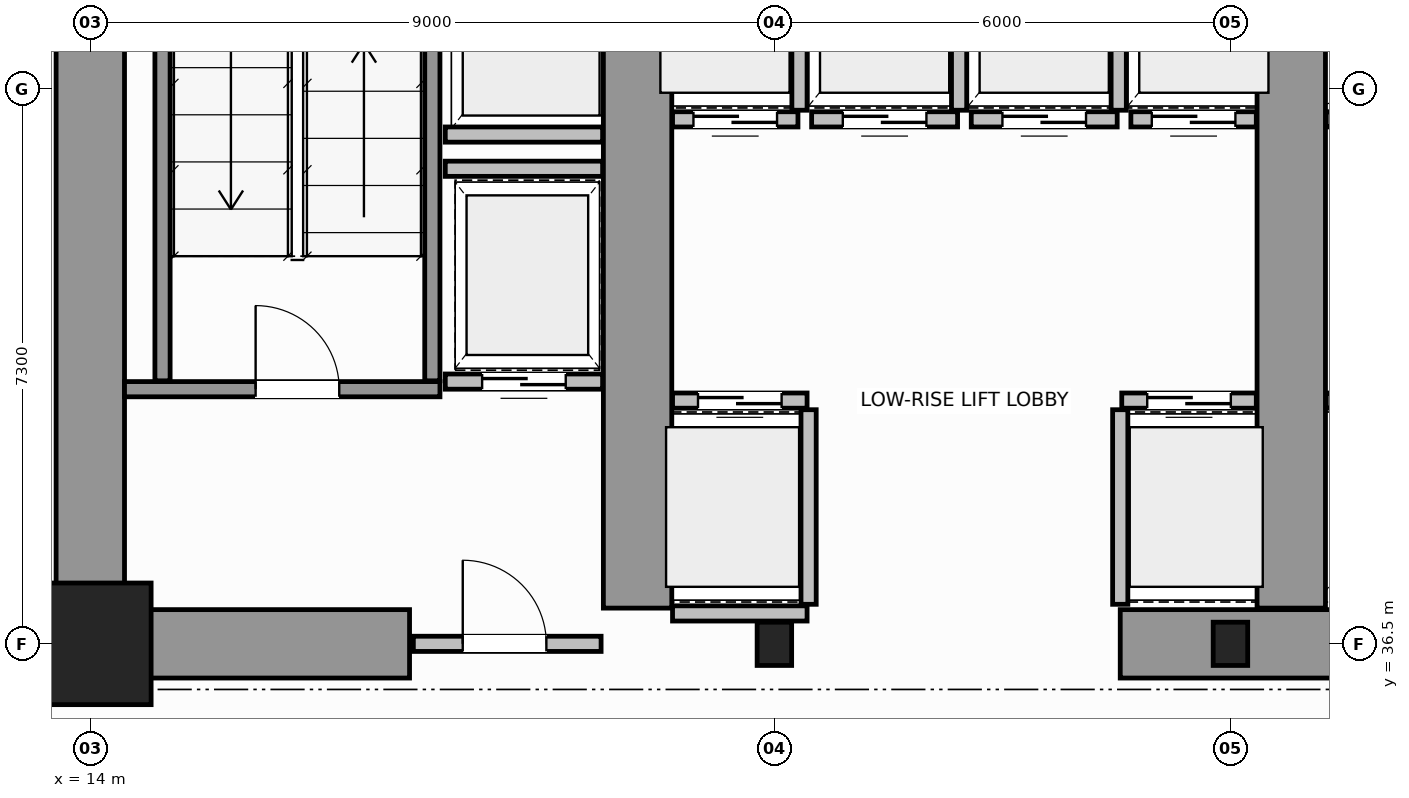
"""IFC4 building model, lengths in metres.
Left out: names, types, materials, properties, quantities, classifications, styles, units other than length and angle.
Written with IfcOpenShell. Run it as: python <this file> out.ifc"""

import sys

from ifc_helpers import new_model, si_unit, direction, frame, frame_2d, origin, origin_2d, place, context, subcontext, project, spatial, rectangle, i_section, extrude, source, transform, mapped, element, fill, save


model = new_model("IFC4")
c1 = context("Model", 3, precision=1e-05, world=origin(), true_north=direction((0.0, 1.0)))
c2 = subcontext(c1, "Body", "Model", "MODEL_VIEW")
j1 = project(units=[si_unit("LENGTHUNIT", "METRE"), si_unit("PLANEANGLEUNIT", "RADIAN")], contexts=[c1])
p1 = place(None, origin())
s1 = spatial("IfcSite", under=j1, at=p1, CompositionType="ELEMENT")
p2 = place(p1, origin())
s2 = spatial("IfcBuilding", under=s1, at=p2, CompositionType="ELEMENT")
p3 = place(p2, frame((0.0, 0.0, 30.2)))
s3 = spatial("IfcBuildingStorey", under=s2, at=p3, CompositionType="ELEMENT", Elevation=30.2)
m1 = source(origin(), c2, "Body", "SweptSolid", [
    extrude(rectangle(XDim=1.6, YDim=1.6, at=origin_2d()), origin(), (0.0, 0.0, 1.0), 3.8),
])
p4 = place(p3, frame((14.0, 36.5, 0.0), z_axis=(0.0, 0.0, 1.0), x_axis=(1.0, 0.0, 0.0)))
e1 = element("IfcColumn", 1, at=p4, inside=s3, PredefinedType="COLUMN", context=c2, shape_type="MappedRepresentation", body=[
    mapped(m1, transform((0.0, 0.0, 0.0), scale=1.0)),
])
m2 = source(origin(), c2, "Body", "SweptSolid", [
    extrude(i_section(OverallWidth=0.454, OverallDepth=0.569, WebThickness=0.078, FlangeThickness=0.08, FilletRadius=0.015, at=origin_2d()), origin(), (0.0, 0.0, 1.0), 3.8),
])
for number, where, z_axis, x_axis in (
    (2, (23.0, 36.5, 0.0), (0.0, 0.0, 1.0), (1.0, 0.0, 0.0)),
    (3, (29.0, 36.5, 0.0), (0.0, 0.0, 1.0), (1.0, 0.0, 0.0)),
):
    element("IfcColumn", number, at=place(p3, frame(where, z_axis=z_axis, x_axis=x_axis)), inside=s3, PredefinedType="COLUMN", context=c2, shape_type="MappedRepresentation", body=[
        mapped(m2, transform((0.0, 0.0, 0.0), scale=1.0)),
    ])
p5 = place(p3, frame((14.0, 36.5, 0.0), z_axis=(0.0, 0.0, 1.0), x_axis=(0.0, 1.0, 0.0)))
e4 = element("IfcWall", 4, at=p5, inside=s3, PredefinedType="SHEAR", context=c2, shape_type="SweptSolid", body=[
    extrude(rectangle(XDim=14.5, YDim=0.9, at=frame_2d((7.25, 0.0))), origin(), (0.0, 0.0, 1.0), 3.8),
])
p6 = place(p3, frame((14.47, 36.5, 0.0), z_axis=(0.0, 0.0, 1.0), x_axis=(1.0, 0.0, 0.0)))
e5 = element("IfcWall", 5, at=p6, inside=s3, PredefinedType="SHEAR", context=c2, shape_type="SweptSolid", body=[
    extrude(rectangle(XDim=3.73, YDim=0.9, at=frame_2d((1.865, 0.0))), origin(), (0.0, 0.0, 1.0), 2.38),
])
p7 = place(p3, frame((27.55, 36.5, 0.0), z_axis=(0.0, 0.0, 1.0), x_axis=(1.0, 0.0, 0.0)))
e6 = element("IfcWall", 6, at=p7, inside=s3, PredefinedType="SHEAR", context=c2, shape_type="SweptSolid", body=[
    extrude(rectangle(XDim=4.5, YDim=0.9, at=frame_2d((2.25, 0.0))), origin(), (0.0, 0.0, 1.0), 3.8),
])
for number, where, z_axis, x_axis in (
    (7, (21.2, 36.97, 0.0), (0.0, 0.0, 1.0), (0.0, 1.0, 0.0)),
    (8, (29.8, 36.97, 0.0), (0.0, 0.0, 1.0), (0.0, 1.0, 0.0)),
):
    element("IfcWall", number, at=place(p3, frame(where, z_axis=z_axis, x_axis=x_axis)), inside=s3, PredefinedType="SHEAR", context=c2, shape_type="SweptSolid", body=[
        extrude(rectangle(XDim=9.23, YDim=0.9, at=frame_2d((4.615, 0.0))), origin(), (0.0, 0.0, 1.0), 3.8),
    ])
p8 = place(p3, frame((14.45, 39.85, 0.0), z_axis=(0.0, 0.0, 1.0), x_axis=(1.0, 0.0, 0.0)))
e9 = element("IfcWall", 9, at=p8, inside=s3, PredefinedType="SOLIDWALL", context=c2, shape_type="SweptSolid", body=[
    extrude(rectangle(XDim=4.15, YDim=0.2, at=frame_2d((2.075, 0.0))), origin(), (0.0, 0.0, 1.0), 3.8),
])
p9 = place(p8, frame((1.725, 0.0, 0.0)))
e10 = element("IfcOpeningElement", 10, at=p9, cuts=e9, PredefinedType="OPENING", context=c2, shape_type="SweptSolid", body=[
    extrude(rectangle(XDim=1.1, YDim=2.15, at=frame_2d((0.55, 1.075))), frame((0.0, 0.11, 0.0), z_axis=(0.0, -1.0, 0.0), x_axis=(1.0, 0.0, 0.0)), (0.0, 0.0, 1.0), 0.22),
])
for number, where, z_axis, x_axis in (
    (11, (14.95, 39.96, 0.0), (0.0, 0.0, 1.0), (0.0, 1.0, 0.0)),
    (12, (18.5, 39.96, 0.0), (0.0, 0.0, 1.0), (0.0, 1.0, 0.0)),
):
    element("IfcWall", number, at=place(p3, frame(where, z_axis=z_axis, x_axis=x_axis)), inside=s3, PredefinedType="SOLIDWALL", context=c2, shape_type="SweptSolid", body=[
        extrude(rectangle(XDim=9.93, YDim=0.2, at=frame_2d((4.965, 0.0))), origin(), (0.0, 0.0, 1.0), 3.8),
    ])
p10 = place(p3, frame((18.25, 36.5, 0.0), z_axis=(0.0, 0.0, 1.0), x_axis=(1.0, 0.0, 0.0)))
e13 = element("IfcWall", 13, at=p10, inside=s3, PredefinedType="SOLIDWALL", context=c2, shape_type="SweptSolid", body=[
    extrude(rectangle(XDim=2.47, YDim=0.2, at=frame_2d((1.235, 0.0))), origin(), (0.0, 0.0, 1.0), 2.37),
])
p11 = place(p10, frame((0.65, 0.0, 0.0)))
e14 = element("IfcOpeningElement", 14, at=p11, cuts=e13, PredefinedType="OPENING", context=c2, shape_type="SweptSolid", body=[
    extrude(rectangle(XDim=1.1, YDim=2.15, at=frame_2d((0.55, 1.075))), frame((0.0, 0.11, 0.0), z_axis=(0.0, -1.0, 0.0), x_axis=(1.0, 0.0, 0.0)), (0.0, 0.0, 1.0), 0.22),
])
p12 = place(p3, frame((21.66, 39.7, 0.0), z_axis=(0.0, 0.0, 1.0), x_axis=(1.0, 0.0, 0.0)))
e15 = element("IfcWall", 15, at=p12, inside=s3, PredefinedType="SOLIDWALL", context=c2, shape_type="SweptSolid", body=[
    extrude(rectangle(XDim=1.77, YDim=0.2, at=frame_2d((0.885, 0.0))), origin(), (0.0, 0.0, 1.0), 3.58),
])
p13 = place(p12, frame((0.335, 0.0, 0.0)))
e16 = element("IfcOpeningElement", 16, at=p13, cuts=e15, PredefinedType="OPENING", context=c2, shape_type="SweptSolid", body=[
    extrude(rectangle(XDim=1.1, YDim=2.15, at=frame_2d((0.55, 1.075))), frame((0.0, 0.11, 0.0), z_axis=(0.0, -1.0, 0.0), x_axis=(1.0, 0.0, 0.0)), (0.0, 0.0, 1.0), 0.22),
])
p14 = place(p3, frame((21.66, 36.9, 0.0), z_axis=(0.0, 0.0, 1.0), x_axis=(1.0, 0.0, 0.0)))
e17 = element("IfcWall", 17, at=p14, inside=s3, PredefinedType="SOLIDWALL", context=c2, shape_type="SweptSolid", body=[
    extrude(rectangle(XDim=1.77, YDim=0.2, at=frame_2d((0.885, 0.0))), origin(), (0.0, 0.0, 1.0), 2.37),
])
p15 = place(p3, frame((23.45, 37.02, 0.0), z_axis=(0.0, 0.0, 1.0), x_axis=(0.0, 1.0, 0.0)))
e18 = element("IfcWall", 18, at=p15, inside=s3, PredefinedType="SOLIDWALL", context=c2, shape_type="SweptSolid", body=[
    extrude(rectangle(XDim=2.56, YDim=0.2, at=frame_2d((1.28, 0.0))), origin(), (0.0, 0.0, 1.0), 3.58),
])
p16 = place(p3, frame((27.57, 39.7, 0.0), z_axis=(0.0, 0.0, 1.0), x_axis=(1.0, 0.0, 0.0)))
e19 = element("IfcWall", 19, at=p16, inside=s3, PredefinedType="SOLIDWALL", context=c2, shape_type="SweptSolid", body=[
    extrude(rectangle(XDim=1.77, YDim=0.2, at=frame_2d((0.885, 0.0))), origin(), (0.0, 0.0, 1.0), 3.58),
])
p17 = place(p16, frame((0.335, 0.0, 0.0)))
e20 = element("IfcOpeningElement", 20, at=p17, cuts=e19, PredefinedType="OPENING", context=c2, shape_type="SweptSolid", body=[
    extrude(rectangle(XDim=1.1, YDim=2.15, at=frame_2d((0.55, 1.075))), frame((0.0, 0.11, 0.0), z_axis=(0.0, -1.0, 0.0), x_axis=(1.0, 0.0, 0.0)), (0.0, 0.0, 1.0), 0.22),
])
p18 = place(p3, frame((27.55, 37.02, 0.0), z_axis=(0.0, 0.0, 1.0), x_axis=(0.0, 1.0, 0.0)))
e21 = element("IfcWall", 21, at=p18, inside=s3, PredefinedType="SOLIDWALL", context=c2, shape_type="SweptSolid", body=[
    extrude(rectangle(XDim=2.56, YDim=0.2, at=frame_2d((1.28, 0.0))), origin(), (0.0, 0.0, 1.0), 3.58),
])
p19 = place(p3, frame((21.66, 43.4, 0.0), z_axis=(0.0, 0.0, 1.0), x_axis=(1.0, 0.0, 0.0)))
e22 = element("IfcWall", 22, at=p19, inside=s3, PredefinedType="SOLIDWALL", context=c2, shape_type="SweptSolid", body=[
    extrude(rectangle(XDim=1.65, YDim=0.2, at=frame_2d((0.825, 0.0))), origin(), (0.0, 0.0, 1.0), 3.58),
])
p20 = place(p19, frame((0.275, 0.0, 0.0)))
e23 = element("IfcOpeningElement", 23, at=p20, cuts=e22, PredefinedType="OPENING", context=c2, shape_type="SweptSolid", body=[
    extrude(rectangle(XDim=1.1, YDim=2.15, at=frame_2d((0.55, 1.075))), frame((0.0, 0.11, 0.0), z_axis=(0.0, -1.0, 0.0), x_axis=(1.0, 0.0, 0.0)), (0.0, 0.0, 1.0), 0.22),
])
p21 = place(p3, frame((23.33, 43.52, 0.0), z_axis=(0.0, 0.0, 1.0), x_axis=(0.0, 1.0, 0.0)))
e24 = element("IfcWall", 24, at=p21, inside=s3, PredefinedType="SOLIDWALL", context=c2, shape_type="SweptSolid", body=[
    extrude(rectangle(XDim=2.56, YDim=0.2, at=frame_2d((1.28, 0.0))), origin(), (0.0, 0.0, 1.0), 3.58),
])
p22 = place(p3, frame((23.49, 43.4, 0.0), z_axis=(0.0, 0.0, 1.0), x_axis=(1.0, 0.0, 0.0)))
e25 = element("IfcWall", 25, at=p22, inside=s3, PredefinedType="SOLIDWALL", context=c2, shape_type="SweptSolid", body=[
    extrude(rectangle(XDim=1.92, YDim=0.2, at=frame_2d((0.96, 0.0))), origin(), (0.0, 0.0, 1.0), 3.58),
])
p23 = place(p22, frame((0.41, 0.0, 0.0)))
e26 = element("IfcOpeningElement", 26, at=p23, cuts=e25, PredefinedType="OPENING", context=c2, shape_type="SweptSolid", body=[
    extrude(rectangle(XDim=1.1, YDim=2.15, at=frame_2d((0.55, 1.075))), frame((0.0, 0.11, 0.0), z_axis=(0.0, -1.0, 0.0), x_axis=(1.0, 0.0, 0.0)), (0.0, 0.0, 1.0), 0.22),
])
p24 = place(p3, frame((25.43, 43.52, 0.0), z_axis=(0.0, 0.0, 1.0), x_axis=(0.0, 1.0, 0.0)))
e27 = element("IfcWall", 27, at=p24, inside=s3, PredefinedType="SOLIDWALL", context=c2, shape_type="SweptSolid", body=[
    extrude(rectangle(XDim=2.56, YDim=0.2, at=frame_2d((1.28, 0.0))), origin(), (0.0, 0.0, 1.0), 3.58),
])
p25 = place(p3, frame((25.59, 43.4, 0.0), z_axis=(0.0, 0.0, 1.0), x_axis=(1.0, 0.0, 0.0)))
e28 = element("IfcWall", 28, at=p25, inside=s3, PredefinedType="SOLIDWALL", context=c2, shape_type="SweptSolid", body=[
    extrude(rectangle(XDim=1.92, YDim=0.2, at=frame_2d((0.96, 0.0))), origin(), (0.0, 0.0, 1.0), 3.58),
])
p26 = place(p25, frame((0.41, 0.0, 0.0)))
e29 = element("IfcOpeningElement", 29, at=p26, cuts=e28, PredefinedType="OPENING", context=c2, shape_type="SweptSolid", body=[
    extrude(rectangle(XDim=1.1, YDim=2.15, at=frame_2d((0.55, 1.075))), frame((0.0, 0.11, 0.0), z_axis=(0.0, -1.0, 0.0), x_axis=(1.0, 0.0, 0.0)), (0.0, 0.0, 1.0), 0.22),
])
p27 = place(p3, frame((27.53, 43.52, 0.0), z_axis=(0.0, 0.0, 1.0), x_axis=(0.0, 1.0, 0.0)))
e30 = element("IfcWall", 30, at=p27, inside=s3, PredefinedType="SOLIDWALL", context=c2, shape_type="SweptSolid", body=[
    extrude(rectangle(XDim=2.56, YDim=0.2, at=frame_2d((1.28, 0.0))), origin(), (0.0, 0.0, 1.0), 3.58),
])
p28 = place(p3, frame((27.69, 43.4, 0.0), z_axis=(0.0, 0.0, 1.0), x_axis=(1.0, 0.0, 0.0)))
e31 = element("IfcWall", 31, at=p28, inside=s3, PredefinedType="SOLIDWALL", context=c2, shape_type="SweptSolid", body=[
    extrude(rectangle(XDim=1.65, YDim=0.2, at=frame_2d((0.825, 0.0))), origin(), (0.0, 0.0, 1.0), 3.58),
])
p29 = place(p28, frame((0.275, 0.0, 0.0)))
e32 = element("IfcOpeningElement", 32, at=p29, cuts=e31, PredefinedType="OPENING", context=c2, shape_type="SweptSolid", body=[
    extrude(rectangle(XDim=1.1, YDim=2.15, at=frame_2d((0.55, 1.075))), frame((0.0, 0.11, 0.0), z_axis=(0.0, -1.0, 0.0), x_axis=(1.0, 0.0, 0.0)), (0.0, 0.0, 1.0), 0.22),
])
p30 = place(p3, frame((30.26, 39.7, 0.0), z_axis=(0.0, 0.0, 1.0), x_axis=(1.0, 0.0, 0.0)))
e33 = element("IfcWall", 33, at=p30, inside=s3, PredefinedType="SOLIDWALL", context=c2, shape_type="SweptSolid", body=[
    extrude(rectangle(XDim=1.77, YDim=0.2, at=frame_2d((0.885, 0.0))), origin(), (0.0, 0.0, 1.0), 3.58),
])
p31 = place(p3, frame((30.26, 43.4, 0.0), z_axis=(0.0, 0.0, 1.0), x_axis=(1.0, 0.0, 0.0)))
e34 = element("IfcWall", 34, at=p31, inside=s3, PredefinedType="SOLIDWALL", context=c2, shape_type="SweptSolid", body=[
    extrude(rectangle(XDim=1.65, YDim=0.2, at=frame_2d((0.825, 0.0))), origin(), (0.0, 0.0, 1.0), 3.58),
])
p32 = place(p3, frame((18.67, 43.2, 0.0), z_axis=(0.0, 0.0, 1.0), x_axis=(1.0, 0.0, 0.0)))
e35 = element("IfcWall", 35, at=p32, inside=s3, PredefinedType="SOLIDWALL", context=c2, shape_type="SweptSolid", body=[
    extrude(rectangle(XDim=2.07, YDim=0.2, at=frame_2d((1.035, 0.0))), origin(), (0.0, 0.0, 1.0), 3.58),
])
p33 = place(p3, frame((18.67, 39.95, 0.0), z_axis=(0.0, 0.0, 1.0), x_axis=(1.0, 0.0, 0.0)))
e36 = element("IfcWall", 36, at=p33, inside=s3, PredefinedType="SOLIDWALL", context=c2, shape_type="SweptSolid", body=[
    extrude(rectangle(XDim=2.07, YDim=0.2, at=frame_2d((1.035, 0.0))), origin(), (0.0, 0.0, 1.0), 3.58),
])
p34 = place(p33, frame((0.485, 0.0, 0.0)))
e37 = element("IfcOpeningElement", 37, at=p34, cuts=e36, PredefinedType="OPENING", context=c2, shape_type="SweptSolid", body=[
    extrude(rectangle(XDim=1.1, YDim=2.15, at=frame_2d((0.55, 1.075))), frame((0.0, 0.11, 0.0), z_axis=(0.0, -1.0, 0.0), x_axis=(1.0, 0.0, 0.0)), (0.0, 0.0, 1.0), 0.22),
])
p35 = place(p3, frame((18.67, 42.75, 0.0), z_axis=(0.0, 0.0, 1.0), x_axis=(1.0, 0.0, 0.0)))
e38 = element("IfcWall", 38, at=p35, inside=s3, PredefinedType="SOLIDWALL", context=c2, shape_type="SweptSolid", body=[
    extrude(rectangle(XDim=2.07, YDim=0.2, at=frame_2d((1.035, 0.0))), origin(), (0.0, 0.0, 1.0), 3.58),
])
p36 = place(p3, frame((7.265, 36.48, 0.0), z_axis=(0.0, 0.0, 1.0), x_axis=(1.0, 0.0, 0.0)))
e39 = element("IfcWall", 39, at=p36, inside=s3, PredefinedType="PARTITIONING", context=c2, shape_type="SweptSolid", body=[
    extrude(rectangle(XDim=6.675, YDim=0.12, at=frame_2d((3.337, 0.0))), origin(), (0.0, 0.0, 1.0), 2.77),
])
p37 = place(p36, frame((2.888, 0.0, 0.0)))
e40 = element("IfcOpeningElement", 40, at=p37, cuts=e39, PredefinedType="OPENING", context=c2, shape_type="SweptSolid", body=[
    extrude(rectangle(XDim=0.9, YDim=2.15, at=frame_2d((0.45, 1.075))), frame((0.0, 0.07, 0.0), z_axis=(0.0, -1.0, 0.0), x_axis=(1.0, 0.0, 0.0)), (0.0, 0.0, 1.0), 0.14),
])
m3 = source(origin(), c2, "Body", "SweptSolid", [
    extrude(rectangle(XDim=1.1, YDim=2.15, at=frame_2d((0.55, 1.075))), frame((0.0, 0.025, 0.0), z_axis=(0.0, -1.0, 0.0), x_axis=(1.0, 0.0, 0.0)), (0.0, 0.0, 1.0), 0.05),
])
p38 = place(p9, origin())
e41 = element("IfcDoor", 41, at=p38, inside=s3, OperationType="SINGLE_SWING_LEFT", PredefinedType="DOOR", context=c2, shape_type="MappedRepresentation", body=[
    mapped(m3, transform((0.0, 0.0, 0.0), scale=1.0)),
])
fill(e10, e41)
p39 = place(p11, origin())
e42 = element("IfcDoor", 42, at=p39, inside=s3, OperationType="SINGLE_SWING_RIGHT", PredefinedType="DOOR", context=c2, shape_type="MappedRepresentation", body=[
    mapped(m3, transform((0.0, 0.0, 0.0), scale=1.0)),
])
fill(e14, e42)
p40 = place(p13, origin())
e43 = element("IfcDoor", 43, at=p40, inside=s3, OperationType="DOUBLE_DOOR_SLIDING", PredefinedType="DOOR", context=c2, shape_type="MappedRepresentation", body=[
    mapped(m3, transform((0.0, 0.0, 0.0), scale=1.0)),
])
fill(e16, e43)
p41 = place(p17, origin())
e44 = element("IfcDoor", 44, at=p41, inside=s3, OperationType="DOUBLE_DOOR_SLIDING", PredefinedType="DOOR", context=c2, shape_type="MappedRepresentation", body=[
    mapped(m3, transform((0.0, 0.0, 0.0), scale=1.0)),
])
fill(e20, e44)
p42 = place(p20, origin())
e45 = element("IfcDoor", 45, at=p42, inside=s3, OperationType="DOUBLE_DOOR_SLIDING", PredefinedType="DOOR", context=c2, shape_type="MappedRepresentation", body=[
    mapped(m3, transform((0.0, 0.0, 0.0), scale=1.0)),
])
fill(e23, e45)
p43 = place(p23, origin())
e46 = element("IfcDoor", 46, at=p43, inside=s3, OperationType="DOUBLE_DOOR_SLIDING", PredefinedType="DOOR", context=c2, shape_type="MappedRepresentation", body=[
    mapped(m3, transform((0.0, 0.0, 0.0), scale=1.0)),
])
fill(e26, e46)
p44 = place(p26, origin())
e47 = element("IfcDoor", 47, at=p44, inside=s3, OperationType="DOUBLE_DOOR_SLIDING", PredefinedType="DOOR", context=c2, shape_type="MappedRepresentation", body=[
    mapped(m3, transform((0.0, 0.0, 0.0), scale=1.0)),
])
fill(e29, e47)
p45 = place(p29, origin())
e48 = element("IfcDoor", 48, at=p45, inside=s3, OperationType="DOUBLE_DOOR_SLIDING", PredefinedType="DOOR", context=c2, shape_type="MappedRepresentation", body=[
    mapped(m3, transform((0.0, 0.0, 0.0), scale=1.0)),
])
fill(e32, e48)
p46 = place(p34, origin())
e49 = element("IfcDoor", 49, at=p46, inside=s3, OperationType="DOUBLE_DOOR_SLIDING", PredefinedType="DOOR", context=c2, shape_type="MappedRepresentation", body=[
    mapped(m3, transform((0.0, 0.0, 0.0), scale=1.0)),
])
fill(e37, e49)
save(model, sys.argv[1])
